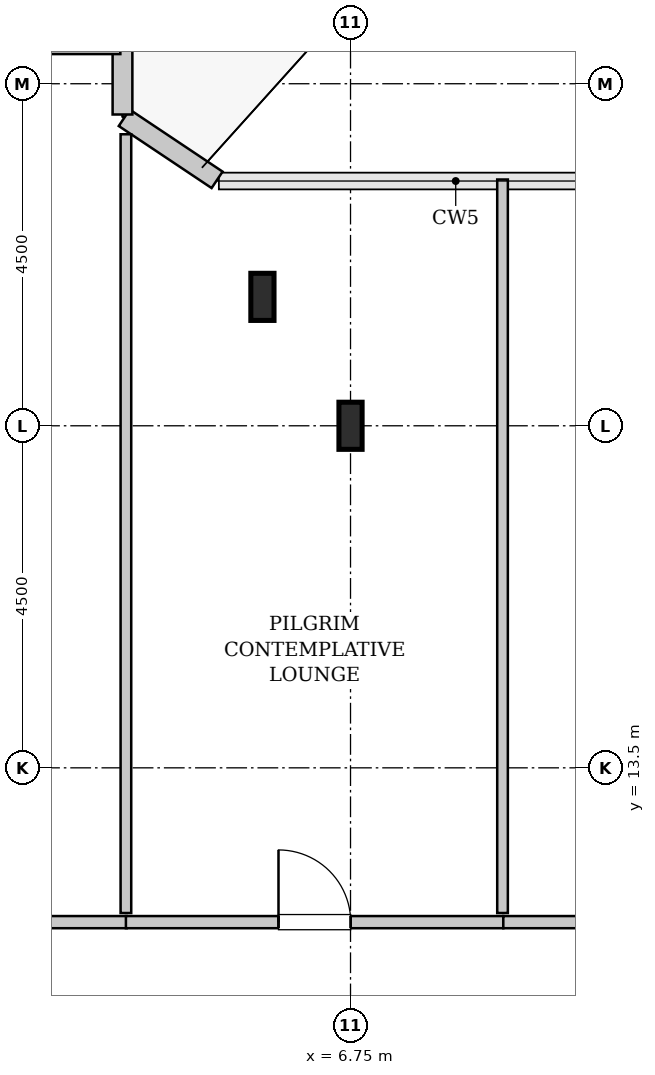
"""IFC4 building model, lengths in metres.
Left out: names, types, materials, properties, quantities, classifications, styles, units other than length and angle.
Written with IfcOpenShell. Run it as: python <this file> out.ifc"""

import sys

from ifc_helpers import new_model, si_unit, direction, frame, frame_2d, origin, origin_2d, place, context, subcontext, project, spatial, rectangle, i_section, extrude, source, transform, mapped, element, fill, save


model = new_model("IFC4")
c1 = context("Model", 3, precision=1e-05, world=origin(), true_north=direction((0.0, 1.0)))
c2 = subcontext(c1, "Body", "Model", "MODEL_VIEW")
j1 = project(units=[si_unit("LENGTHUNIT", "METRE"), si_unit("PLANEANGLEUNIT", "RADIAN")], contexts=[c1])
p1 = place(None, origin())
s1 = spatial("IfcSite", under=j1, at=p1, CompositionType="ELEMENT")
p2 = place(p1, origin())
s2 = spatial("IfcBuilding", under=s1, at=p2, CompositionType="ELEMENT")
p3 = place(p2, frame((0.0, 0.0, 310.2)))
s3 = spatial("IfcBuildingStorey", under=s2, at=p3, CompositionType="ELEMENT", Elevation=310.2)
m1 = source(origin(), c2, "Body", "SweptSolid", [
    extrude(i_section(OverallWidth=0.305, OverallDepth=0.62, WebThickness=0.021, FlangeThickness=0.04, FilletRadius=0.027, at=origin_2d()), origin(), (0.0, 0.0, 1.0), 3.8),
])
for number, where, z_axis, x_axis in (
    (1, (5.591, 19.696, 0.0), (0.0, 0.0, 1.0), (1.0, 0.0, 0.0)),
    (2, (6.75, 18.0, 0.0), (0.0, 0.0, 1.0), (1.0, 0.0, 0.0)),
):
    element("IfcColumn", number, at=place(p3, frame(where, z_axis=z_axis, x_axis=x_axis)), inside=s3, PredefinedType="COLUMN", context=c2, shape_type="MappedRepresentation", body=[
        mapped(m1, transform((0.0, 0.0, 0.0), x_axis=(1.0, 0.0, 0.0), y_axis=(0.0, 1.0, 0.0), z_axis=(0.0, 0.0, 1.0), scale=1.0)),
    ])
m2 = source(origin(), c2, "Body", "SweptSolid", [
    extrude(rectangle(XDim=1.469, YDim=0.26, at=frame_2d((0.734, 0.0))), origin(), (0.0, 0.0, 1.0), 3.55),
])
p4 = place(p3, frame((4.995, 21.236, 0.0), z_axis=(0.0, 0.0, 1.0), x_axis=(-0.831461760506, 0.555581983884, 0.0)))
e3 = element("IfcWall", 3, at=p4, inside=s3, PredefinedType="SOLIDWALL", context=c2, shape_type="MappedRepresentation", body=[
    mapped(m2, transform((0.0, 0.0, 0.0), x_axis=(1.0, 0.0, 0.0), y_axis=(0.0, 1.0, 0.0), z_axis=(0.0, 0.0, 1.0), scale=1.0)),
])
m3 = source(origin(), c2, "Body", "SweptSolid", [
    extrude(rectangle(XDim=0.897, YDim=0.26, at=frame_2d((0.448, 0.0))), origin(), (0.0, 0.0, 1.0), 3.55),
])
p5 = place(p3, frame((3.75, 22.095, 0.0), z_axis=(0.0, 0.0, 1.0), x_axis=(0.0, 1.0, 0.0)))
e4 = element("IfcWall", 4, at=p5, inside=s3, PredefinedType="SOLIDWALL", context=c2, shape_type="MappedRepresentation", body=[
    mapped(m3, transform((0.0, 0.0, 0.0), x_axis=(1.0, 0.0, 0.0), y_axis=(0.0, 1.0, 0.0), z_axis=(0.0, 0.0, 1.0), scale=1.0)),
])
m4 = source(origin(), c2, "Body", "SweptSolid", [
    extrude(rectangle(XDim=1.37, YDim=0.26, at=frame_2d((0.685, 0.0))), origin(), (0.0, 0.0, 1.0), 3.55),
])
p6 = place(p3, frame((3.722, 23.02, 0.0), z_axis=(0.0, 0.0, 1.0), x_axis=(-1.0, 0.0, 0.0)))
e5 = element("IfcWall", 5, at=p6, inside=s3, PredefinedType="SOLIDWALL", context=c2, shape_type="MappedRepresentation", body=[
    mapped(m4, transform((0.0, 0.0, 0.0), x_axis=(1.0, 0.0, 0.0), y_axis=(0.0, 1.0, 0.0), z_axis=(0.0, 0.0, 1.0), scale=1.0)),
])
m5 = source(origin(), c2, "Body", "SweptSolid", [
    extrude(rectangle(XDim=5.605, YDim=0.16, at=frame_2d((2.802, 0.0))), origin(), (0.0, 0.0, 1.0), 3.535),
])
p7 = place(p3, frame((-1.8, 11.47, 0.0), z_axis=(0.0, 0.0, 1.0), x_axis=(1.0, 0.0, 0.0)))
e6 = element("IfcWall", 6, at=p7, inside=s3, PredefinedType="PARTITIONING", context=c2, shape_type="MappedRepresentation", body=[
    mapped(m5, transform((0.0, 0.0, 0.0), x_axis=(1.0, 0.0, 0.0), y_axis=(0.0, 1.0, 0.0), z_axis=(0.0, 0.0, 1.0), scale=1.0)),
])
p8 = place(p7, frame((2.327, 0.0, 0.0)))
e7 = element("IfcOpeningElement", 7, at=p8, cuts=e6, PredefinedType="OPENING", context=c2, shape_type="SweptSolid", body=[
    extrude(rectangle(XDim=0.95, YDim=2.1, at=frame_2d((0.475, 1.05))), frame((0.0, 0.09, 0.0), z_axis=(0.0, -1.0, 0.0), x_axis=(1.0, 0.0, 0.0)), (0.0, 0.0, 1.0), 0.18),
])
m6 = source(origin(), c2, "Body", "SweptSolid", [
    extrude(rectangle(XDim=10.245, YDim=0.14, at=frame_2d((5.123, 0.0))), origin(), (0.0, 0.0, 1.0), 3.535),
])
p9 = place(p3, frame((3.795, 11.59, 0.0), z_axis=(0.0, 0.0, 1.0), x_axis=(0.0, 1.0, 0.0)))
e8 = element("IfcWall", 8, at=p9, inside=s3, PredefinedType="PARTITIONING", context=c2, shape_type="MappedRepresentation", body=[
    mapped(m6, transform((0.0, 0.0, 0.0), x_axis=(1.0, 0.0, 0.0), y_axis=(0.0, 1.0, 0.0), z_axis=(0.0, 0.0, 1.0), scale=1.0)),
])
m7 = source(origin(), c2, "Body", "SweptSolid", [
    extrude(rectangle(XDim=4.965, YDim=0.16, at=frame_2d((2.482, 0.0))), origin(), (0.0, 0.0, 1.0), 3.535),
])
p10 = place(p3, frame((3.795, 11.47, 0.0), z_axis=(0.0, 0.0, 1.0), x_axis=(1.0, 0.0, 0.0)))
e9 = element("IfcWall", 9, at=p10, inside=s3, PredefinedType="PARTITIONING", context=c2, shape_type="MappedRepresentation", body=[
    mapped(m7, transform((0.0, 0.0, 0.0), x_axis=(1.0, 0.0, 0.0), y_axis=(0.0, 1.0, 0.0), z_axis=(0.0, 0.0, 1.0), scale=1.0)),
])
p11 = place(p10, frame((2.008, 0.0, 0.0)))
e10 = element("IfcOpeningElement", 10, at=p11, cuts=e9, PredefinedType="OPENING", context=c2, shape_type="SweptSolid", body=[
    extrude(rectangle(XDim=0.95, YDim=2.1, at=frame_2d((0.475, 1.05))), frame((0.0, 0.09, 0.0), z_axis=(0.0, -1.0, 0.0), x_axis=(1.0, 0.0, 0.0)), (0.0, 0.0, 1.0), 0.18),
])
m8 = source(origin(), c2, "Body", "SweptSolid", [
    extrude(rectangle(XDim=9.65, YDim=0.14, at=frame_2d((4.825, 0.0))), origin(), (0.0, 0.0, 1.0), 3.535),
])
p12 = place(p3, frame((8.75, 11.59, 0.0), z_axis=(0.0, 0.0, 1.0), x_axis=(0.0, 1.0, 0.0)))
e11 = element("IfcWall", 11, at=p12, inside=s3, PredefinedType="PARTITIONING", context=c2, shape_type="MappedRepresentation", body=[
    mapped(m8, transform((0.0, 0.0, 0.0), x_axis=(1.0, 0.0, 0.0), y_axis=(0.0, 1.0, 0.0), z_axis=(0.0, 0.0, 1.0), scale=1.0)),
])
m9 = source(origin(), c2, "Body", "SweptSolid", [
    extrude(rectangle(XDim=4.86, YDim=0.16, at=frame_2d((2.43, 0.0))), origin(), (0.0, 0.0, 1.0), 3.535),
])
p13 = place(p3, frame((8.76, 11.47, 0.0), z_axis=(0.0, 0.0, 1.0), x_axis=(1.0, 0.0, 0.0)))
e12 = element("IfcWall", 12, at=p13, inside=s3, PredefinedType="PARTITIONING", context=c2, shape_type="MappedRepresentation", body=[
    mapped(m9, transform((0.0, 0.0, 0.0), x_axis=(1.0, 0.0, 0.0), y_axis=(0.0, 1.0, 0.0), z_axis=(0.0, 0.0, 1.0), scale=1.0)),
])
p14 = place(p13, frame((1.955, 0.0, 0.0)))
e13 = element("IfcOpeningElement", 13, at=p14, cuts=e12, PredefinedType="OPENING", context=c2, shape_type="SweptSolid", body=[
    extrude(rectangle(XDim=0.95, YDim=2.1, at=frame_2d((0.475, 1.05))), frame((0.0, 0.09, 0.0), z_axis=(0.0, -1.0, 0.0), x_axis=(1.0, 0.0, 0.0)), (0.0, 0.0, 1.0), 0.18),
])
m10 = source(origin(), c2, "Body", "SweptSolid", [
    extrude(rectangle(XDim=0.95, YDim=2.1, at=frame_2d((0.475, 1.05))), frame((0.0, 0.025, 0.0), z_axis=(0.0, -1.0, 0.0), x_axis=(1.0, 0.0, 0.0)), (0.0, 0.0, 1.0), 0.05),
])
p15 = place(p11, origin())
e14 = element("IfcDoor", 14, at=p15, inside=s3, OperationType="SINGLE_SWING_LEFT", PredefinedType="DOOR", context=c2, shape_type="MappedRepresentation", body=[
    mapped(m10, transform((0.0, 0.0, 0.0), x_axis=(1.0, 0.0, 0.0), y_axis=(0.0, 1.0, 0.0), z_axis=(0.0, 0.0, 1.0), scale=1.0)),
])
fill(e10, e14)
save(model, sys.argv[1])
